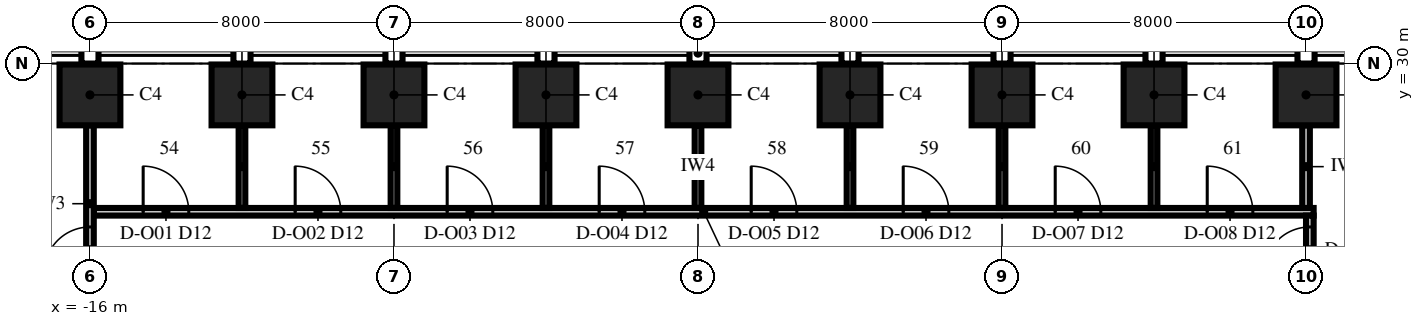
"""IFC4 building model, lengths in metres.
Left out: names, types, materials, properties, quantities, classifications, styles, units other than length and angle.
Written with IfcOpenShell. Run it as: python <this file> out.ifc"""

import sys

from ifc_helpers import new_model, si_unit, direction, frame, frame_2d, origin, origin_2d, place, context, subcontext, project, spatial, rectangle, extrude, element, fill, save


model = new_model("IFC4")
c1 = context("Model", 3, precision=1e-05, world=origin(), true_north=direction((0.0, 1.0)))
c2 = subcontext(c1, "Body", "Model", "MODEL_VIEW")
j1 = project(units=[si_unit("LENGTHUNIT", "METRE"), si_unit("PLANEANGLEUNIT", "RADIAN")], contexts=[c1])
p1 = place(None, origin())
s1 = spatial("IfcSite", under=j1, at=p1, CompositionType="ELEMENT")
p2 = place(p1, origin())
s2 = spatial("IfcBuilding", under=s1, at=p2, CompositionType="ELEMENT")
p3 = place(p2, frame((0.0, 0.0, 214.0)))
s3 = spatial("IfcBuildingStorey", under=s2, at=p3, CompositionType="ELEMENT", Elevation=214.0)
for number, where, z_axis, x_axis in (
    (1, (16.0, 29.175, 0.0), (0.0, 0.0, 1.0), (-1.0, 0.0, 0.0)),
    (2, (12.0, 29.175, 0.0), (0.0, 0.0, 1.0), (-1.0, 0.0, 0.0)),
    (3, (8.0, 29.175, 0.0), (0.0, 0.0, 1.0), (-1.0, 0.0, 0.0)),
    (4, (4.0, 29.175, 0.0), (0.0, 0.0, 1.0), (-1.0, 0.0, 0.0)),
    (5, (0.0, 29.175, 0.0), (0.0, 0.0, 1.0), (-1.0, 0.0, 0.0)),
    (6, (-4.0, 29.175, 0.0), (0.0, 0.0, 1.0), (-1.0, 0.0, 0.0)),
    (7, (-8.0, 29.175, 0.0), (0.0, 0.0, 1.0), (-1.0, 0.0, 0.0)),
    (8, (-12.0, 29.175, 0.0), (0.0, 0.0, 1.0), (-1.0, 0.0, 0.0)),
    (9, (-16.0, 29.175, 0.0), (0.0, 0.0, 1.0), (-1.0, 0.0, 0.0)),
):
    element("IfcColumn", number, at=place(p3, frame(where, z_axis=z_axis, x_axis=x_axis)), inside=s3, PredefinedType="COLUMN", context=c2, shape_type="SweptSolid", body=[
        extrude(rectangle(XDim=1.6, YDim=1.6, at=origin_2d()), origin(), (0.0, 0.0, 1.0), 4.0),
    ])
p4 = place(p3, frame((-15.9, 26.1, 0.0), z_axis=(0.0, 0.0, 1.0), x_axis=(1.0, 0.0, 0.0)))
e10 = element("IfcWall", 10, at=p4, inside=s3, PredefinedType="PARTITIONING", context=c2, shape_type="SweptSolid", body=[
    extrude(rectangle(XDim=32.1, YDim=0.2, at=frame_2d((16.05, 0.0))), origin(), (0.0, 0.0, 1.0), 3.4),
])
p5 = place(p4, frame((1.3, 0.0, 0.0)))
e11 = element("IfcOpeningElement", 11, at=p5, cuts=e10, PredefinedType="OPENING", context=c2, shape_type="SweptSolid", body=[
    extrude(rectangle(XDim=1.2, YDim=2.4, at=frame_2d((0.6, 1.2))), frame((0.0, 0.115, 0.0), z_axis=(0.0, -1.0, 0.0), x_axis=(1.0, 0.0, 0.0)), (0.0, 0.0, 1.0), 0.23),
])
p6 = place(p4, frame((5.3, 0.0, 0.0)))
e12 = element("IfcOpeningElement", 12, at=p6, cuts=e10, PredefinedType="OPENING", context=c2, shape_type="SweptSolid", body=[
    extrude(rectangle(XDim=1.2, YDim=2.4, at=frame_2d((0.6, 1.2))), frame((0.0, 0.115, 0.0), z_axis=(0.0, -1.0, 0.0), x_axis=(1.0, 0.0, 0.0)), (0.0, 0.0, 1.0), 0.23),
])
p7 = place(p4, frame((9.3, 0.0, 0.0)))
e13 = element("IfcOpeningElement", 13, at=p7, cuts=e10, PredefinedType="OPENING", context=c2, shape_type="SweptSolid", body=[
    extrude(rectangle(XDim=1.2, YDim=2.4, at=frame_2d((0.6, 1.2))), frame((0.0, 0.115, 0.0), z_axis=(0.0, -1.0, 0.0), x_axis=(1.0, 0.0, 0.0)), (0.0, 0.0, 1.0), 0.23),
])
p8 = place(p4, frame((13.3, 0.0, 0.0)))
e14 = element("IfcOpeningElement", 14, at=p8, cuts=e10, PredefinedType="OPENING", context=c2, shape_type="SweptSolid", body=[
    extrude(rectangle(XDim=1.2, YDim=2.4, at=frame_2d((0.6, 1.2))), frame((0.0, 0.115, 0.0), z_axis=(0.0, -1.0, 0.0), x_axis=(1.0, 0.0, 0.0)), (0.0, 0.0, 1.0), 0.23),
])
p9 = place(p4, frame((17.3, 0.0, 0.0)))
e15 = element("IfcOpeningElement", 15, at=p9, cuts=e10, PredefinedType="OPENING", context=c2, shape_type="SweptSolid", body=[
    extrude(rectangle(XDim=1.2, YDim=2.4, at=frame_2d((0.6, 1.2))), frame((0.0, 0.115, 0.0), z_axis=(0.0, -1.0, 0.0), x_axis=(1.0, 0.0, 0.0)), (0.0, 0.0, 1.0), 0.23),
])
p10 = place(p4, frame((21.3, 0.0, 0.0)))
e16 = element("IfcOpeningElement", 16, at=p10, cuts=e10, PredefinedType="OPENING", context=c2, shape_type="SweptSolid", body=[
    extrude(rectangle(XDim=1.2, YDim=2.4, at=frame_2d((0.6, 1.2))), frame((0.0, 0.115, 0.0), z_axis=(0.0, -1.0, 0.0), x_axis=(1.0, 0.0, 0.0)), (0.0, 0.0, 1.0), 0.23),
])
p11 = place(p4, frame((25.3, 0.0, 0.0)))
e17 = element("IfcOpeningElement", 17, at=p11, cuts=e10, PredefinedType="OPENING", context=c2, shape_type="SweptSolid", body=[
    extrude(rectangle(XDim=1.2, YDim=2.4, at=frame_2d((0.6, 1.2))), frame((0.0, 0.115, 0.0), z_axis=(0.0, -1.0, 0.0), x_axis=(1.0, 0.0, 0.0)), (0.0, 0.0, 1.0), 0.23),
])
p12 = place(p4, frame((29.3, 0.0, 0.0)))
e18 = element("IfcOpeningElement", 18, at=p12, cuts=e10, PredefinedType="OPENING", context=c2, shape_type="SweptSolid", body=[
    extrude(rectangle(XDim=1.2, YDim=2.4, at=frame_2d((0.6, 1.2))), frame((0.0, 0.115, 0.0), z_axis=(0.0, -1.0, 0.0), x_axis=(1.0, 0.0, 0.0)), (0.0, 0.0, 1.0), 0.23),
])
p13 = place(p3, frame((-16.0, 24.25, 0.0), z_axis=(0.0, 0.0, 1.0), x_axis=(0.0, 1.0, 0.0)))
e19 = element("IfcWall", 19, at=p13, inside=s3, PredefinedType="PARTITIONING", context=c2, shape_type="SweptSolid", body=[
    extrude(rectangle(XDim=4.125, YDim=0.2, at=frame_2d((2.062, 0.0))), origin(), (0.0, 0.0, 1.0), 3.4),
])
p14 = place(p13, frame((0.25, 0.0, 0.0)))
e20 = element("IfcOpeningElement", 20, at=p14, cuts=e19, PredefinedType="OPENING", context=c2, shape_type="SweptSolid", body=[
    extrude(rectangle(XDim=1.2, YDim=2.4, at=frame_2d((0.6, 1.2))), frame((0.0, 0.115, 0.0), z_axis=(0.0, -1.0, 0.0), x_axis=(1.0, 0.0, 0.0)), (0.0, 0.0, 1.0), 0.23),
])
for number, where, z_axis, x_axis in (
    (21, (-12.0, 26.2, 0.0), (0.0, 0.0, 1.0), (0.0, 1.0, 0.0)),
    (22, (-8.0, 26.2, 0.0), (0.0, 0.0, 1.0), (0.0, 1.0, 0.0)),
    (23, (-4.0, 26.2, 0.0), (0.0, 0.0, 1.0), (0.0, 1.0, 0.0)),
    (24, (0.0, 26.2, 0.0), (0.0, 0.0, 1.0), (0.0, 1.0, 0.0)),
    (25, (4.0, 26.2, 0.0), (0.0, 0.0, 1.0), (0.0, 1.0, 0.0)),
    (26, (8.0, 26.2, 0.0), (0.0, 0.0, 1.0), (0.0, 1.0, 0.0)),
    (27, (12.0, 26.2, 0.0), (0.0, 0.0, 1.0), (0.0, 1.0, 0.0)),
):
    element("IfcWall", number, at=place(p3, frame(where, z_axis=z_axis, x_axis=x_axis)), inside=s3, PredefinedType="PARTITIONING", context=c2, shape_type="SweptSolid", body=[
        extrude(rectangle(XDim=2.175, YDim=0.175, at=frame_2d((1.087, 0.0))), origin(), (0.0, 0.0, 1.0), 3.4),
    ])
p15 = place(p3, frame((16.0, 26.2, 0.0), z_axis=(0.0, 0.0, 1.0), x_axis=(0.0, 1.0, 0.0)))
e28 = element("IfcWall", 28, at=p15, inside=s3, PredefinedType="PARTITIONING", context=c2, shape_type="SweptSolid", body=[
    extrude(rectangle(XDim=2.175, YDim=0.2, at=frame_2d((1.087, 0.0))), origin(), (0.0, 0.0, 1.0), 3.4),
])
p16 = place(p3, frame((16.1, 9.9, 0.0), z_axis=(0.0, 0.0, 1.0), x_axis=(0.0, 1.0, 0.0)))
e29 = element("IfcWall", 29, at=p16, inside=s3, PredefinedType="PARTITIONING", context=c2, shape_type="SweptSolid", body=[
    extrude(rectangle(XDim=16.1, YDim=0.2, at=frame_2d((8.05, 0.0))), origin(), (0.0, 0.0, 1.0), 3.25),
])
p17 = place(p16, frame((14.6, 0.0, 0.0)))
e30 = element("IfcOpeningElement", 30, at=p17, cuts=e29, PredefinedType="OPENING", context=c2, shape_type="SweptSolid", body=[
    extrude(rectangle(XDim=1.2, YDim=2.4, at=frame_2d((0.6, 1.2))), frame((0.0, 0.115, 0.0), z_axis=(0.0, -1.0, 0.0), x_axis=(1.0, 0.0, 0.0)), (0.0, 0.0, 1.0), 0.23),
])
p18 = place(p5, origin())
e31 = element("IfcDoor", 31, at=p18, inside=s3, OperationType="SINGLE_SWING_LEFT", PredefinedType="DOOR", context=c2, shape_type="SweptSolid", body=[
    extrude(rectangle(XDim=1.2, YDim=2.4, at=frame_2d((0.6, 1.2))), frame((0.0, 0.1, 0.0), z_axis=(0.0, -1.0, 0.0), x_axis=(1.0, 0.0, 0.0)), (0.0, 0.0, 1.0), 0.199),
])
fill(e11, e31)
p19 = place(p6, origin())
e32 = element("IfcDoor", 32, at=p19, inside=s3, OperationType="SINGLE_SWING_LEFT", PredefinedType="DOOR", context=c2, shape_type="SweptSolid", body=[
    extrude(rectangle(XDim=1.2, YDim=2.4, at=frame_2d((0.6, 1.2))), frame((0.0, 0.1, 0.0), z_axis=(0.0, -1.0, 0.0), x_axis=(1.0, 0.0, 0.0)), (0.0, 0.0, 1.0), 0.199),
])
fill(e12, e32)
p20 = place(p7, origin())
e33 = element("IfcDoor", 33, at=p20, inside=s3, OperationType="SINGLE_SWING_LEFT", PredefinedType="DOOR", context=c2, shape_type="SweptSolid", body=[
    extrude(rectangle(XDim=1.2, YDim=2.4, at=frame_2d((0.6, 1.2))), frame((0.0, 0.1, 0.0), z_axis=(0.0, -1.0, 0.0), x_axis=(1.0, 0.0, 0.0)), (0.0, 0.0, 1.0), 0.199),
])
fill(e13, e33)
p21 = place(p8, origin())
e34 = element("IfcDoor", 34, at=p21, inside=s3, OperationType="SINGLE_SWING_LEFT", PredefinedType="DOOR", context=c2, shape_type="SweptSolid", body=[
    extrude(rectangle(XDim=1.2, YDim=2.4, at=frame_2d((0.6, 1.2))), frame((0.0, 0.1, 0.0), z_axis=(0.0, -1.0, 0.0), x_axis=(1.0, 0.0, 0.0)), (0.0, 0.0, 1.0), 0.199),
])
fill(e14, e34)
p22 = place(p9, origin())
e35 = element("IfcDoor", 35, at=p22, inside=s3, OperationType="SINGLE_SWING_LEFT", PredefinedType="DOOR", context=c2, shape_type="SweptSolid", body=[
    extrude(rectangle(XDim=1.2, YDim=2.4, at=frame_2d((0.6, 1.2))), frame((0.0, 0.1, 0.0), z_axis=(0.0, -1.0, 0.0), x_axis=(1.0, 0.0, 0.0)), (0.0, 0.0, 1.0), 0.199),
])
fill(e15, e35)
p23 = place(p10, origin())
e36 = element("IfcDoor", 36, at=p23, inside=s3, OperationType="SINGLE_SWING_LEFT", PredefinedType="DOOR", context=c2, shape_type="SweptSolid", body=[
    extrude(rectangle(XDim=1.2, YDim=2.4, at=frame_2d((0.6, 1.2))), frame((0.0, 0.1, 0.0), z_axis=(0.0, -1.0, 0.0), x_axis=(1.0, 0.0, 0.0)), (0.0, 0.0, 1.0), 0.199),
])
fill(e16, e36)
p24 = place(p11, origin())
e37 = element("IfcDoor", 37, at=p24, inside=s3, OperationType="SINGLE_SWING_LEFT", PredefinedType="DOOR", context=c2, shape_type="SweptSolid", body=[
    extrude(rectangle(XDim=1.2, YDim=2.4, at=frame_2d((0.6, 1.2))), frame((0.0, 0.1, 0.0), z_axis=(0.0, -1.0, 0.0), x_axis=(1.0, 0.0, 0.0)), (0.0, 0.0, 1.0), 0.199),
])
fill(e17, e37)
p25 = place(p12, origin())
e38 = element("IfcDoor", 38, at=p25, inside=s3, OperationType="SINGLE_SWING_LEFT", PredefinedType="DOOR", context=c2, shape_type="SweptSolid", body=[
    extrude(rectangle(XDim=1.2, YDim=2.4, at=frame_2d((0.6, 1.2))), frame((0.0, 0.1, 0.0), z_axis=(0.0, -1.0, 0.0), x_axis=(1.0, 0.0, 0.0)), (0.0, 0.0, 1.0), 0.199),
])
fill(e18, e38)
p26 = place(p14, origin())
e39 = element("IfcDoor", 39, at=p26, inside=s3, OperationType="SINGLE_SWING_LEFT", PredefinedType="DOOR", context=c2, shape_type="SweptSolid", body=[
    extrude(rectangle(XDim=1.2, YDim=2.4, at=frame_2d((0.6, 1.2))), frame((0.0, 0.1, 0.0), z_axis=(0.0, -1.0, 0.0), x_axis=(1.0, 0.0, 0.0)), (0.0, 0.0, 1.0), 0.199),
])
fill(e20, e39)
p27 = place(p17, origin())
e40 = element("IfcDoor", 40, at=p27, inside=s3, OperationType="SINGLE_SWING_LEFT", PredefinedType="DOOR", context=c2, shape_type="SweptSolid", body=[
    extrude(rectangle(XDim=1.2, YDim=2.4, at=frame_2d((0.6, 1.2))), frame((0.0, 0.1, 0.0), z_axis=(0.0, -1.0, 0.0), x_axis=(1.0, 0.0, 0.0)), (0.0, 0.0, 1.0), 0.199),
])
fill(e30, e40)
save(model, sys.argv[1])
